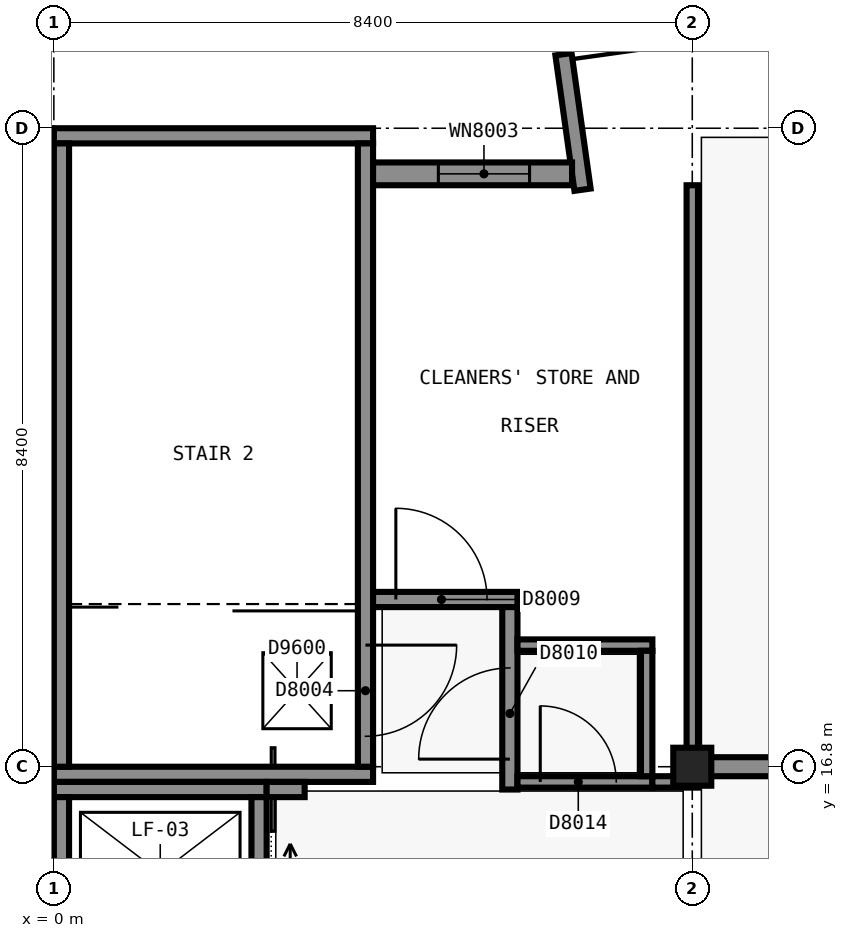
"""IFC4 building model, lengths in metres.
Left out: names, types, materials, properties, quantities, classifications, styles, units other than length and angle.
Written with IfcOpenShell. Run it as: python <this file> out.ifc"""

import sys

from ifc_helpers import new_model, si_unit, direction, frame, frame_2d, origin, origin_2d, place, context, subcontext, project, spatial, rectangle, extrude, element, fill, save


model = new_model("IFC4")
c1 = context("Model", 3, precision=1e-05, world=origin(), true_north=direction((0.0, 1.0)))
c2 = subcontext(c1, "Body", "Model", "MODEL_VIEW")
j1 = project(units=[si_unit("LENGTHUNIT", "METRE"), si_unit("PLANEANGLEUNIT", "RADIAN")], contexts=[c1])
p1 = place(None, origin())
s1 = spatial("IfcSite", under=j1, at=p1, CompositionType="ELEMENT")
p2 = place(p1, origin())
s2 = spatial("IfcBuilding", under=s1, at=p2, CompositionType="ELEMENT")
p3 = place(p2, frame((0.0, 0.0, 38.1)))
s3 = spatial("IfcBuildingStorey", under=s2, at=p3, CompositionType="ELEMENT", Elevation=38.1)
for number, where, z_axis, x_axis in (
    (1, (4.2, 16.7, 0.0), (0.0, 0.0, 1.0), (-1.0, 0.0, 0.0)),
    (2, (0.0, 25.1, 0.0), (0.0, 0.0, 1.0), (1.0, 0.0, 0.0)),
):
    element("IfcWall", number, at=place(p3, frame(where, z_axis=z_axis, x_axis=x_axis)), inside=s3, PredefinedType="SHEAR", context=c2, shape_type="SweptSolid", body=[
        extrude(rectangle(XDim=4.199, YDim=0.2, at=frame_2d((2.1, 0.0))), origin(), (0.0, 0.0, 1.0), 4.5),
    ])
p4 = place(p3, frame((0.1, 16.8, 0.0), z_axis=(0.0, 0.0, 1.0), x_axis=(0.0, 1.0, 0.0)))
e3 = element("IfcWall", 3, at=p4, inside=s3, PredefinedType="SHEAR", context=c2, shape_type="SweptSolid", body=[
    extrude(rectangle(XDim=8.2, YDim=0.2, at=frame_2d((4.1, 0.0))), origin(), (0.0, 0.0, 1.0), 4.5),
])
p5 = place(p3, frame((4.1, 25.0, 0.0), z_axis=(0.0, 0.0, 1.0), x_axis=(0.0, -1.0, 0.0)))
e4 = element("IfcWall", 4, at=p5, inside=s3, PredefinedType="SHEAR", context=c2, shape_type="SweptSolid", body=[
    extrude(rectangle(XDim=8.2, YDim=0.2, at=frame_2d((4.1, 0.0))), origin(), (0.0, 0.0, 1.0), 4.5),
])
p6 = place(p5, frame((6.6, 0.0, 0.0)))
e5 = element("IfcOpeningElement", 5, at=p6, cuts=e4, PredefinedType="OPENING", context=c2, shape_type="SweptSolid", body=[
    extrude(rectangle(XDim=1.2, YDim=2.1, at=frame_2d((0.6, 1.05))), frame((0.0, 0.11, 0.0), z_axis=(0.0, -1.0, 0.0), x_axis=(1.0, 0.0, 0.0)), (0.0, 0.0, 1.0), 0.22),
])
p7 = place(p3, frame((0.0, 16.5, 0.0), z_axis=(0.0, 0.0, 1.0), x_axis=(1.0, 0.0, 0.0)))
e6 = element("IfcWall", 6, at=p7, inside=s3, PredefinedType="SHEAR", context=c2, shape_type="SweptSolid", body=[
    extrude(rectangle(XDim=2.8, YDim=0.2, at=frame_2d((1.4, 0.0))), origin(), (0.0, 0.0, 1.0), 4.5),
])
p8 = place(p3, frame((0.1, 14.3, 0.0), z_axis=(0.0, 0.0, 1.0), x_axis=(0.0, 1.0, 0.0)))
e7 = element("IfcWall", 7, at=p8, inside=s3, PredefinedType="SHEAR", context=c2, shape_type="SweptSolid", body=[
    extrude(rectangle(XDim=2.1, YDim=0.2, at=frame_2d((1.05, 0.0))), origin(), (0.0, 0.0, 1.0), 4.5),
])
p9 = place(p3, frame((2.7, 16.4, 0.0), z_axis=(0.0, 0.0, 1.0), x_axis=(0.0, -1.0, 0.0)))
e8 = element("IfcWall", 8, at=p9, inside=s3, PredefinedType="SHEAR", context=c2, shape_type="SweptSolid", body=[
    extrude(rectangle(XDim=2.1, YDim=0.2, at=frame_2d((1.05, 0.0))), origin(), (0.0, 0.0, 1.0), 4.5),
])
p10 = place(p9, frame((0.45, 0.0, 0.0)))
e9 = element("IfcOpeningElement", 9, at=p10, cuts=e8, PredefinedType="OPENING", context=c2, shape_type="SweptSolid", body=[
    extrude(rectangle(XDim=1.1, YDim=2.1, at=frame_2d((0.55, 1.05))), frame((0.0, 0.11, 0.0), z_axis=(0.0, -1.0, 0.0), x_axis=(1.0, 0.0, 0.0)), (0.0, 0.0, 1.0), 0.22),
])
p11 = place(p3, frame((8.4, 16.8, 0.0), z_axis=(0.0, 0.0, 1.0), x_axis=(1.0, 0.0, 0.0)))
e10 = element("IfcColumn", 10, at=p11, inside=s3, PredefinedType="COLUMN", context=c2, shape_type="SweptSolid", body=[
    extrude(rectangle(XDim=0.5, YDim=0.5, at=origin_2d()), origin(), (0.0, 0.0, 1.0), 4.5),
])
p12 = place(p3, frame((2.8, 16.5, 0.0), z_axis=(0.0, 0.0, 1.0), x_axis=(1.0, 0.0, 0.0)))
e11 = element("IfcWall", 11, at=p12, inside=s3, PredefinedType="SHEAR", context=c2, shape_type="SweptSolid", body=[
    extrude(rectangle(XDim=0.5, YDim=0.2, at=frame_2d((0.25, 0.0))), origin(), (0.0, 0.0, 1.0), 4.5),
])
p13 = place(p3, frame((6.956, 24.391, 0.0), z_axis=(0.0, 0.0, 1.0), x_axis=(-0.139161311926, 0.990269725511, 0.0)))
e12 = element("IfcWall", 12, at=p13, inside=s3, PredefinedType="SOLIDWALL", context=c2, shape_type="SweptSolid", body=[
    extrude(rectangle(XDim=1.8, YDim=0.215, at=frame_2d((0.9, 0.0))), origin(), (0.0, 0.0, 1.0), 4.2),
])
p14 = place(p3, frame((4.2, 24.6, 0.0), z_axis=(0.0, 0.0, 1.0), x_axis=(1.0, 0.0, 0.0)))
e13 = element("IfcWall", 13, at=p14, inside=s3, PredefinedType="SOLIDWALL", context=c2, shape_type="SweptSolid", body=[
    extrude(rectangle(XDim=2.618, YDim=0.3, at=frame_2d((1.309, 0.0))), origin(), (0.0, 0.0, 1.0), 4.2),
])
p15 = place(p14, frame((0.859, 0.0, 0.9)))
e14 = element("IfcOpeningElement", 14, at=p15, cuts=e13, PredefinedType="OPENING", context=c2, shape_type="SweptSolid", body=[
    extrude(rectangle(XDim=1.2, YDim=1.5, at=frame_2d((0.6, 0.75))), frame((0.0, 0.16, 0.0), z_axis=(0.0, -1.0, 0.0), x_axis=(1.0, 0.0, 0.0)), (0.0, 0.0, 1.0), 0.32),
])
p16 = place(p3, frame((8.275, 16.8, 0.0), z_axis=(0.0, 0.0, 1.0), x_axis=(1.0, 0.0, 0.0)))
e15 = element("IfcWall", 15, at=p16, inside=s3, PredefinedType="PARTITIONING", context=c2, shape_type="SweptSolid", body=[
    extrude(rectangle(XDim=12.85, YDim=0.25, at=frame_2d((6.425, 0.0))), origin(), (0.0, 0.0, 1.0), 3.4),
])
p17 = place(p16, frame((8.925, 0.0, 0.0)))
e16 = element("IfcOpeningElement", 16, at=p17, cuts=e15, PredefinedType="OPENING", context=c2, shape_type="SweptSolid", body=[
    extrude(rectangle(XDim=1.2, YDim=2.1, at=frame_2d((0.6, 1.05))), frame((0.0, 0.135, 0.0), z_axis=(0.0, -1.0, 0.0), x_axis=(1.0, 0.0, 0.0)), (0.0, 0.0, 1.0), 0.27),
])
p18 = place(p3, frame((4.2, 19.0, 0.0), z_axis=(0.0, 0.0, 1.0), x_axis=(1.0, 0.0, 0.0)))
e17 = element("IfcWall", 17, at=p18, inside=s3, PredefinedType="SOLIDWALL", context=c2, shape_type="SweptSolid", body=[
    extrude(rectangle(XDim=1.9, YDim=0.2, at=frame_2d((0.95, 0.0))), origin(), (0.0, 0.0, 1.0), 4.2),
])
p19 = place(p18, frame((0.3, 0.0, 0.0)))
e18 = element("IfcOpeningElement", 18, at=p19, cuts=e17, PredefinedType="OPENING", context=c2, shape_type="SweptSolid", body=[
    extrude(rectangle(XDim=1.2, YDim=2.1, at=frame_2d((0.6, 1.05))), frame((0.0, 0.11, 0.0), z_axis=(0.0, -1.0, 0.0), x_axis=(1.0, 0.0, 0.0)), (0.0, 0.0, 1.0), 0.22),
])
p20 = place(p3, frame((6.0, 16.5, 0.0), z_axis=(0.0, 0.0, 1.0), x_axis=(0.0, 1.0, 0.0)))
e19 = element("IfcWall", 19, at=p20, inside=s3, PredefinedType="SOLIDWALL", context=c2, shape_type="SweptSolid", body=[
    extrude(rectangle(XDim=2.4, YDim=0.2, at=frame_2d((1.2, 0.0))), origin(), (0.0, 0.0, 1.0), 3.6),
])
p21 = place(p20, frame((0.4, 0.0, 0.0)))
e20 = element("IfcOpeningElement", 20, at=p21, cuts=e19, PredefinedType="OPENING", context=c2, shape_type="SweptSolid", body=[
    extrude(rectangle(XDim=1.2, YDim=2.1, at=frame_2d((0.6, 1.05))), frame((0.0, 0.11, 0.0), z_axis=(0.0, -1.0, 0.0), x_axis=(1.0, 0.0, 0.0)), (0.0, 0.0, 1.0), 0.22),
])
p22 = place(p3, frame((6.1, 16.6, 0.0), z_axis=(0.0, 0.0, 1.0), x_axis=(1.0, 0.0, 0.0)))
e21 = element("IfcWall", 21, at=p22, inside=s3, PredefinedType="PARTITIONING", context=c2, shape_type="SweptSolid", body=[
    extrude(rectangle(XDim=1.775, YDim=0.15, at=frame_2d((0.887, 0.0))), origin(), (0.0, 0.0, 1.0), 3.6),
])
p23 = place(p22, frame((0.3, 0.0, 0.0)))
e22 = element("IfcOpeningElement", 22, at=p23, cuts=e21, PredefinedType="OPENING", context=c2, shape_type="SweptSolid", body=[
    extrude(rectangle(XDim=1.0, YDim=2.1, at=frame_2d((0.5, 1.05))), frame((0.0, 0.085, 0.0), z_axis=(0.0, -1.0, 0.0), x_axis=(1.0, 0.0, 0.0)), (0.0, 0.0, 1.0), 0.17),
])
p24 = place(p3, frame((7.875, 16.6, 0.0), z_axis=(0.0, 0.0, 1.0), x_axis=(1.0, 0.0, 0.0)))
e23 = element("IfcWall", 23, at=p24, inside=s3, PredefinedType="SOLIDWALL", context=c2, shape_type="SweptSolid", body=[
    extrude(rectangle(XDim=0.6, YDim=0.15, at=frame_2d((0.3, 0.0))), origin(), (0.0, 0.0, 1.0), 3.4),
])
p25 = place(p3, frame((6.1, 18.4, 0.0), z_axis=(0.0, 0.0, 1.0), x_axis=(1.0, 0.0, 0.0)))
e24 = element("IfcWall", 24, at=p25, inside=s3, PredefinedType="SOLIDWALL", context=c2, shape_type="SweptSolid", body=[
    extrude(rectangle(XDim=1.775, YDim=0.15, at=frame_2d((0.887, 0.0))), origin(), (0.0, 0.0, 1.0), 4.2),
])
p26 = place(p3, frame((7.8, 16.675, 0.0), z_axis=(0.0, 0.0, 1.0), x_axis=(0.0, 1.0, 0.0)))
e25 = element("IfcWall", 25, at=p26, inside=s3, PredefinedType="SOLIDWALL", context=c2, shape_type="SweptSolid", body=[
    extrude(rectangle(XDim=1.65, YDim=0.15, at=frame_2d((0.825, 0.0))), origin(), (0.0, 0.0, 1.0), 3.6),
])
p27 = place(p3, frame((8.4, 16.925, 0.0), z_axis=(0.0, 0.0, 1.0), x_axis=(0.0, 1.0, 0.0)))
e26 = element("IfcWall", 26, at=p27, inside=s3, PredefinedType="SOLIDWALL", context=c2, shape_type="SweptSolid", body=[
    extrude(rectangle(XDim=7.525, YDim=0.15, at=frame_2d((3.762, 0.0))), origin(), (0.0, 0.0, 1.0), 3.4),
])
p28 = place(p15, origin())
e27 = element("IfcWindow", 27, at=p28, inside=s3, PartitioningType="SINGLE_PANEL", PredefinedType="WINDOW", context=c2, shape_type="SweptSolid", body=[
    extrude(rectangle(XDim=1.2, YDim=1.5, at=frame_2d((0.6, 0.75))), frame((0.0, 0.03, 0.0), z_axis=(0.0, -1.0, 0.0), x_axis=(1.0, 0.0, 0.0)), (0.0, 0.0, 1.0), 0.06),
])
fill(e14, e27)
p29 = place(p2, frame((0.0, 0.0, 42.6)))
p30 = place(p29, frame((0.0, 0.0, -0.4)))
p31 = place(p30, frame((3.2, 17.8, 0.0)))
p32 = place(p31, frame((0.0, 0.0, 0.35)))
e28 = element("IfcDoor", 28, at=p32, inside=s3, OperationType="SINGLE_SWING_LEFT", PredefinedType="TRAPDOOR", context=c2, shape_type="SweptSolid", body=[
    extrude(rectangle(XDim=0.9, YDim=1.0, at=origin_2d()), origin(), (0.0, 0.0, 1.0), 0.05),
])
p33 = place(p10, origin())
e29 = element("IfcDoor", 29, at=p33, inside=s3, OperationType="SLIDING_TO_LEFT", PredefinedType="DOOR", context=c2, shape_type="SweptSolid", body=[
    extrude(rectangle(XDim=1.1, YDim=2.1, at=frame_2d((0.55, 1.05))), frame((0.0, 0.025, 0.0), z_axis=(0.0, -1.0, 0.0), x_axis=(1.0, 0.0, 0.0)), (0.0, 0.0, 1.0), 0.05),
])
fill(e9, e29)
p34 = place(p6, origin())
e30 = element("IfcDoor", 30, at=p34, inside=s3, OperationType="SINGLE_SWING_RIGHT", PredefinedType="DOOR", context=c2, shape_type="SweptSolid", body=[
    extrude(rectangle(XDim=1.2, YDim=2.1, at=frame_2d((0.6, 1.05))), frame((0.0, 0.025, 0.0), z_axis=(0.0, -1.0, 0.0), x_axis=(1.0, 0.0, 0.0)), (0.0, 0.0, 1.0), 0.05),
])
fill(e5, e30)
p35 = place(p19, origin())
e31 = element("IfcDoor", 31, at=p35, inside=s3, OperationType="SINGLE_SWING_LEFT", PredefinedType="DOOR", context=c2, shape_type="SweptSolid", body=[
    extrude(rectangle(XDim=1.2, YDim=2.1, at=frame_2d((0.6, 1.05))), frame((0.0, 0.025, 0.0), z_axis=(0.0, -1.0, 0.0), x_axis=(1.0, 0.0, 0.0)), (0.0, 0.0, 1.0), 0.05),
])
fill(e18, e31)
p36 = place(p21, origin())
e32 = element("IfcDoor", 32, at=p36, inside=s3, OperationType="SINGLE_SWING_RIGHT", PredefinedType="DOOR", context=c2, shape_type="SweptSolid", body=[
    extrude(rectangle(XDim=1.2, YDim=2.1, at=frame_2d((0.6, 1.05))), frame((0.0, 0.025, 0.0), z_axis=(0.0, -1.0, 0.0), x_axis=(1.0, 0.0, 0.0)), (0.0, 0.0, 1.0), 0.05),
])
fill(e20, e32)
p37 = place(p23, origin())
e33 = element("IfcDoor", 33, at=p37, inside=s3, OperationType="SINGLE_SWING_RIGHT", PredefinedType="DOOR", context=c2, shape_type="SweptSolid", body=[
    extrude(rectangle(XDim=1.0, YDim=2.1, at=frame_2d((0.5, 1.05))), frame((0.0, 0.025, 0.0), z_axis=(0.0, -1.0, 0.0), x_axis=(1.0, 0.0, 0.0)), (0.0, 0.0, 1.0), 0.05),
])
fill(e22, e33)
save(model, sys.argv[1])
